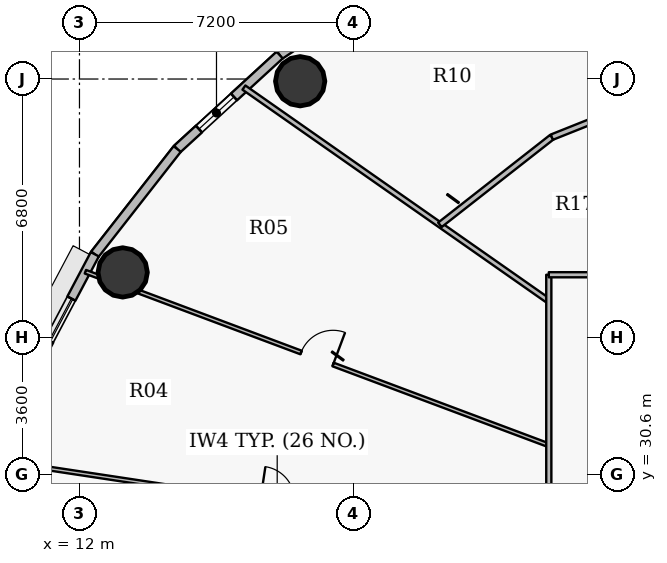
"""IFC4 building model, lengths in metres.
Left out: names, types, materials, properties, quantities, classifications, styles, units other than length and angle.
Written with IfcOpenShell. Run it as: python <this file> out.ifc"""

import sys

from ifc_helpers import new_model, si_unit, direction, frame, frame_2d, origin, origin_2d, place, context, subcontext, project, spatial, rectangle, hollow_circle, extrude, source, transform, mapped, element, fill, save


model = new_model("IFC4")
c1 = context("Model", 3, precision=1e-05, world=origin(), true_north=direction((0.0, 1.0)))
c2 = subcontext(c1, "Body", "Model", "MODEL_VIEW")
j1 = project(units=[si_unit("LENGTHUNIT", "METRE"), si_unit("PLANEANGLEUNIT", "RADIAN")], contexts=[c1])
p1 = place(None, origin())
s1 = spatial("IfcSite", under=j1, at=p1, CompositionType="ELEMENT")
p2 = place(p1, origin())
s2 = spatial("IfcBuilding", under=s1, at=p2, CompositionType="ELEMENT")
p3 = place(p2, frame((0.0, 0.0, 171.15)))
s3 = spatial("IfcBuildingStorey", under=s2, at=p3, CompositionType="ELEMENT", Elevation=171.15)
for number, where, z_axis, x_axis in (
    (1, (17.808, 40.942, 0.0), (0.0, 0.0, 1.0), (1.0, 0.0, 0.0)),
    (2, (13.137, 35.911, 0.0), (0.0, 0.0, 1.0), (1.0, 0.0, 0.0)),
):
    element("IfcColumn", number, at=place(p3, frame(where, z_axis=z_axis, x_axis=x_axis)), inside=s3, PredefinedType="COLUMN", context=c2, shape_type="SweptSolid", body=[
        extrude(hollow_circle(Radius=0.65, WallThickness=0.04, at=origin_2d()), origin(), (0.0, 0.0, 1.0), 3.75),
    ])
p4 = place(p3, frame((17.268, 41.631, 0.0), z_axis=(0.0, 0.0, 1.0), x_axis=(0.831228998277, 0.555930168657, 0.0)))
e3 = element("IfcWall", 3, at=p4, inside=s3, PredefinedType="SOLIDWALL", context=c2, shape_type="SweptSolid", body=[
    extrude(rectangle(XDim=3.8, YDim=0.24, at=frame_2d((1.9, 0.0))), origin(), (0.0, 0.0, 1.0), 3.5),
])
p5 = place(p3, frame((14.572, 39.158, 0.0), z_axis=(0.0, 0.0, 1.0), x_axis=(0.737076565834, 0.675809245349, 0.0)))
e4 = element("IfcWall", 4, at=p5, inside=s3, PredefinedType="SOLIDWALL", context=c2, shape_type="SweptSolid", body=[
    extrude(rectangle(XDim=3.658, YDim=0.24, at=frame_2d((1.829, 0.0))), origin(), (0.0, 0.0, 1.0), 3.5),
])
p6 = place(p5, frame((0.778, 0.0, 0.9)))
e5 = element("IfcOpeningElement", 5, at=p6, cuts=e4, PredefinedType="OPENING", context=c2, shape_type="SweptSolid", body=[
    extrude(rectangle(XDim=1.25, YDim=1.65, at=origin_2d()), frame((0.625, 0.13, 0.825), z_axis=(0.0, -1.0, 0.0), x_axis=(1.0, 0.0, 0.0)), (0.0, 0.0, 1.0), 0.26),
])
p7 = place(p3, frame((12.404, 36.388, 0.0), z_axis=(0.0, 0.0, 1.0), x_axis=(0.616287674549, 0.787521112224, 0.0)))
e6 = element("IfcWall", 6, at=p7, inside=s3, PredefinedType="SOLIDWALL", context=c2, shape_type="SweptSolid", body=[
    extrude(rectangle(XDim=3.517, YDim=0.24, at=frame_2d((1.759, 0.0))), origin(), (0.0, 0.0, 1.0), 3.5),
])
p8 = place(p3, frame((10.817, 33.389, 0.0), z_axis=(0.0, 0.0, 1.0), x_axis=(0.467586874938, 0.88394712194, 0.0)))
e7 = element("IfcWall", 7, at=p8, inside=s3, PredefinedType="SOLIDWALL", context=c2, shape_type="SweptSolid", body=[
    extrude(rectangle(XDim=3.393, YDim=0.24, at=frame_2d((1.697, 0.0))), origin(), (0.0, 0.0, 1.0), 3.5),
])
p9 = place(p8, frame((0.825, 0.0, 0.9)))
e8 = element("IfcOpeningElement", 8, at=p9, cuts=e7, PredefinedType="OPENING", context=c2, shape_type="SweptSolid", body=[
    extrude(rectangle(XDim=1.25, YDim=1.65, at=origin_2d()), frame((0.625, 0.13, 0.825), z_axis=(0.0, -1.0, 0.0), x_axis=(1.0, 0.0, 0.0)), (0.0, 0.0, 1.0), 0.26),
])
p10 = place(p3, frame((10.056, 30.924, 0.0), z_axis=(0.0, 0.0, 1.0), x_axis=(0.988757382987, -0.149528718277, 0.0)))
e9 = element("IfcWall", 9, at=p10, inside=s3, PredefinedType="PARTITIONING", context=c2, shape_type="SweptSolid", body=[
    extrude(rectangle(XDim=14.456, YDim=0.1, at=frame_2d((7.228, 0.0))), origin(), (0.0, 0.0, 1.0), 2.935),
])
p11 = place(p10, frame((6.778, 0.0, 0.0)))
e10 = element("IfcOpeningElement", 10, at=p11, cuts=e9, PredefinedType="OPENING", context=c2, shape_type="SweptSolid", body=[
    extrude(rectangle(XDim=0.9, YDim=2.1, at=origin_2d()), frame((0.45, 0.06, 1.05), z_axis=(0.0, -1.0, 0.0), x_axis=(1.0, 0.0, 0.0)), (0.0, 0.0, 1.0), 0.12),
])
p12 = place(p3, frame((12.156, 35.93, 0.0), z_axis=(0.0, 0.0, 1.0), x_axis=(0.936480111121, -0.350720688689, 0.0)))
e11 = element("IfcWall", 11, at=p12, inside=s3, PredefinedType="PARTITIONING", context=c2, shape_type="SweptSolid", body=[
    extrude(rectangle(XDim=13.021, YDim=0.1, at=frame_2d((6.511, 0.0))), origin(), (0.0, 0.0, 1.0), 2.935),
])
p13 = place(p12, frame((6.061, 0.0, 0.0)))
e12 = element("IfcOpeningElement", 12, at=p13, cuts=e11, PredefinedType="OPENING", context=c2, shape_type="SweptSolid", body=[
    extrude(rectangle(XDim=0.9, YDim=2.1, at=origin_2d()), frame((0.45, 0.06, 1.05), z_axis=(0.0, -1.0, 0.0), x_axis=(1.0, 0.0, 0.0)), (0.0, 0.0, 1.0), 0.12),
])
p14 = place(p3, frame((16.327, 40.775, 0.0), z_axis=(0.0, 0.0, 1.0), x_axis=(0.819149932575, -0.573579452179, 0.0)))
e13 = element("IfcWall", 13, at=p14, inside=s3, PredefinedType="PARTITIONING", context=c2, shape_type="SweptSolid", body=[
    extrude(rectangle(XDim=9.794, YDim=0.135, at=frame_2d((4.897, 0.0))), origin(), (0.0, 0.0, 1.0), 2.935),
])
p15 = place(p3, frame((21.485, 37.164, 0.0), z_axis=(0.0, 0.0, 1.0), x_axis=(0.787295634213, 0.616575692311, 0.0)))
e14 = element("IfcWall", 14, at=p15, inside=s3, PredefinedType="PARTITIONING", context=c2, shape_type="SweptSolid", body=[
    extrude(rectangle(XDim=3.741, YDim=0.15, at=frame_2d((1.871, 0.0))), origin(), (0.0, 0.0, 1.0), 2.935),
])
p16 = place(p3, frame((23.699, 45.319, 0.0), z_axis=(0.0, 0.0, 1.0), x_axis=(0.557458426319, -0.830204856, 0.0)))
e15 = element("IfcWall", 15, at=p16, inside=s3, PredefinedType="PARTITIONING", context=c2, shape_type="SweptSolid", body=[
    extrude(rectangle(XDim=11.406, YDim=0.15, at=frame_2d((5.703, 0.0))), origin(), (0.0, 0.0, 1.0), 2.935),
])
p17 = place(p16, frame((2.412, 0.0, 0.0)))
e16 = element("IfcOpeningElement", 16, at=p17, cuts=e15, PredefinedType="OPENING", context=c2, shape_type="SweptSolid", body=[
    extrude(rectangle(XDim=1.05, YDim=2.15, at=origin_2d()), frame((0.525, 0.085, 1.075), z_axis=(0.0, -1.0, 0.0), x_axis=(1.0, 0.0, 0.0)), (0.0, 0.0, 1.0), 0.17),
])
p18 = place(p3, frame((24.35, 27.95, 0.0), z_axis=(0.0, 0.0, 1.0), x_axis=(0.0, 1.0, 0.0)))
e17 = element("IfcWall", 17, at=p18, inside=s3, PredefinedType="PARTITIONING", context=c2, shape_type="SweptSolid", body=[
    extrude(rectangle(XDim=7.9, YDim=0.135, at=frame_2d((3.95, 0.0))), origin(), (0.0, 0.0, 1.0), 2.935),
])
p19 = place(p3, frame((24.35, 35.85, 0.0), z_axis=(0.0, 0.0, 1.0), x_axis=(1.0, 0.0, 0.0)))
e18 = element("IfcWall", 18, at=p19, inside=s3, PredefinedType="PARTITIONING", context=c2, shape_type="SweptSolid", body=[
    extrude(rectangle(XDim=19.343, YDim=0.135, at=frame_2d((9.671, 0.0))), origin(), (0.0, 0.0, 1.0), 2.935),
])
p20 = place(p19, frame((11.98, 0.0, 0.0)))
e19 = element("IfcOpeningElement", 19, at=p20, cuts=e18, PredefinedType="OPENING", context=c2, shape_type="SweptSolid", body=[
    extrude(rectangle(XDim=1.05, YDim=2.15, at=origin_2d()), frame((0.525, 0.078, 1.075), z_axis=(0.0, -1.0, 0.0), x_axis=(1.0, 0.0, 0.0)), (0.0, 0.0, 1.0), 0.155),
])
p21 = place(p19, frame((2.464, 0.0, 0.0)))
e20 = element("IfcOpeningElement", 20, at=p21, cuts=e18, PredefinedType="OPENING", context=c2, shape_type="SweptSolid", body=[
    extrude(rectangle(XDim=0.82, YDim=2.1, at=origin_2d()), frame((0.41, 0.078, 1.05), z_axis=(0.0, -1.0, 0.0), x_axis=(1.0, 0.0, 0.0)), (0.0, 0.0, 1.0), 0.155),
])
p22 = place(p3, frame((24.43, 39.47, 0.0), z_axis=(0.0, 0.0, 1.0), x_axis=(0.928811262565, 0.370553152103, 0.0)))
e21 = element("IfcWall", 21, at=p22, inside=s3, PredefinedType="PARTITIONING", context=c2, shape_type="SweptSolid", body=[
    extrude(rectangle(XDim=2.715, YDim=0.15, at=frame_2d((1.357, 0.0))), origin(), (0.0, 0.0, 1.0), 3.5),
])
m1 = source(origin(), c2, "Body", "SweptSolid", [
    extrude(rectangle(XDim=1.25, YDim=1.65, at=origin_2d()), frame((0.625, 0.03, 0.825), z_axis=(0.0, -1.0, 0.0), x_axis=(1.0, 0.0, 0.0)), (0.0, 0.0, 1.0), 0.06),
])
p23 = place(p6, origin())
e22 = element("IfcWindow", 22, at=p23, inside=s3, PartitioningType="SINGLE_PANEL", PredefinedType="WINDOW", context=c2, shape_type="MappedRepresentation", body=[
    mapped(m1, transform((0.0, 0.0, 0.0), x_axis=(1.0, 0.0, 0.0), y_axis=(0.0, 1.0, 0.0), z_axis=(0.0, 0.0, 1.0), scale=1.0)),
])
fill(e5, e22)
p24 = place(p9, origin())
e23 = element("IfcWindow", 23, at=p24, inside=s3, PartitioningType="SINGLE_PANEL", PredefinedType="WINDOW", context=c2, shape_type="MappedRepresentation", body=[
    mapped(m1, transform((0.0, 0.0, 0.0), x_axis=(1.0, 0.0, 0.0), y_axis=(0.0, 1.0, 0.0), z_axis=(0.0, 0.0, 1.0), scale=1.0)),
])
fill(e8, e23)
m2 = source(origin(), c2, "Body", "SweptSolid", [
    extrude(rectangle(XDim=0.9, YDim=2.1, at=origin_2d()), frame((0.45, 0.025, 1.05), z_axis=(0.0, -1.0, 0.0), x_axis=(1.0, 0.0, 0.0)), (0.0, 0.0, 1.0), 0.05),
])
p25 = place(p13, origin())
e24 = element("IfcDoor", 24, at=p25, inside=s3, OperationType="SINGLE_SWING_RIGHT", PredefinedType="DOOR", context=c2, shape_type="MappedRepresentation", body=[
    mapped(m2, transform((0.0, 0.0, 0.0), x_axis=(1.0, 0.0, 0.0), y_axis=(0.0, 1.0, 0.0), z_axis=(0.0, 0.0, 1.0), scale=1.0)),
])
fill(e12, e24)
save(model, sys.argv[1])
